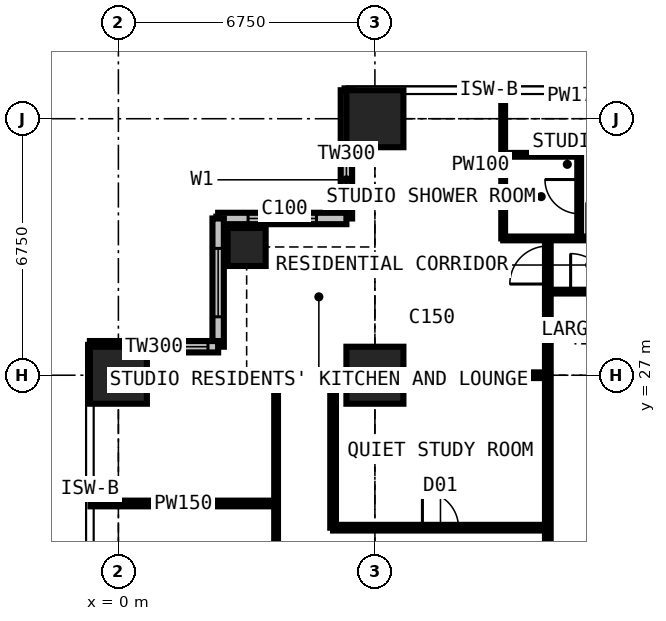
"""IFC4 building model, lengths in metres.
Left out: names, types, materials, properties, quantities, classifications, styles, units other than length and angle.
Written with IfcOpenShell. Run it as: python <this file> out.ifc"""

import sys

from ifc_helpers import new_model, si_unit, direction, frame, frame_2d, origin, origin_2d, place, context, subcontext, project, spatial, rectangle, extrude, element, fill, save


model = new_model("IFC4")
c1 = context("Model", 3, precision=1e-05, world=origin(), true_north=direction((0.0, 1.0)))
c2 = subcontext(c1, "Body", "Model", "MODEL_VIEW")
j1 = project(units=[si_unit("LENGTHUNIT", "METRE"), si_unit("PLANEANGLEUNIT", "RADIAN")], contexts=[c1])
p1 = place(None, origin())
s1 = spatial("IfcSite", under=j1, at=p1, CompositionType="ELEMENT")
p2 = place(p1, origin())
s2 = spatial("IfcBuilding", under=s1, at=p2, CompositionType="ELEMENT")
p3 = place(p2, frame((0.0, 0.0, 123.3)))
s3 = spatial("IfcBuildingStorey", under=s2, at=p3, CompositionType="ELEMENT", Elevation=123.3)
p4 = place(p3, frame((0.0, 27.0, 0.0), z_axis=(0.0, 0.0, 1.0), x_axis=(1.0, 0.0, 0.0)))
e1 = element("IfcColumn", 1, at=p4, inside=s3, PredefinedType="COLUMN", context=c2, shape_type="SweptSolid", body=[
    extrude(rectangle(XDim=1.5, YDim=1.5, at=origin_2d()), origin(), (0.0, 0.0, 1.0), 3.6),
])
p5 = place(p3, frame((3.375, 30.375, 0.0), z_axis=(0.0, 0.0, 1.0), x_axis=(1.0, 0.0, 0.0)))
e2 = element("IfcColumn", 2, at=p5, inside=s3, PredefinedType="COLUMN", context=c2, shape_type="SweptSolid", body=[
    extrude(rectangle(XDim=1.0, YDim=1.0, at=origin_2d()), origin(), (0.0, 0.0, 1.0), 3.6),
])
for number, where, z_axis, x_axis in (
    (3, (6.75, 27.0, 0.0), (0.0, 0.0, 1.0), (1.0, 0.0, 0.0)),
    (4, (6.75, 33.75, 0.0), (0.0, 0.0, 1.0), (1.0, 0.0, 0.0)),
):
    element("IfcColumn", number, at=place(p3, frame(where, z_axis=z_axis, x_axis=x_axis)), inside=s3, PredefinedType="COLUMN", context=c2, shape_type="SweptSolid", body=[
        extrude(rectangle(XDim=1.5, YDim=1.5, at=origin_2d()), origin(), (0.0, 0.0, 1.0), 3.6),
    ])
p6 = place(p3, frame((6.0, 34.5, 0.0), z_axis=(0.0, 0.0, 1.0), x_axis=(0.0, -1.0, 0.0)))
e5 = element("IfcWall", 5, at=p6, inside=s3, PredefinedType="SOLIDWALL", context=c2, shape_type="SweptSolid", body=[
    extrude(rectangle(XDim=3.375, YDim=0.3, at=frame_2d((1.688, 0.0))), origin(), (0.0, 0.0, 1.0), 3.375),
])
p7 = place(p6, frame((1.607, 0.0, 0.9)))
e6 = element("IfcOpeningElement", 6, at=p7, cuts=e5, PredefinedType="OPENING", context=c2, shape_type="SweptSolid", body=[
    extrude(rectangle(XDim=1.5, YDim=1.8, at=frame_2d((0.75, 0.9))), frame((0.0, 0.16, 0.0), z_axis=(0.0, -1.0, 0.0), x_axis=(1.0, 0.0, 0.0)), (0.0, 0.0, 1.0), 0.32),
])
p8 = place(p3, frame((6.0, 31.125, 0.0), z_axis=(0.0, 0.0, 1.0), x_axis=(-1.0, 0.0, 0.0)))
e7 = element("IfcWall", 7, at=p8, inside=s3, PredefinedType="SOLIDWALL", context=c2, shape_type="SweptSolid", body=[
    extrude(rectangle(XDim=3.375, YDim=0.3, at=frame_2d((1.688, 0.0))), origin(), (0.0, 0.0, 1.0), 3.375),
])
p9 = place(p8, frame((0.788, 0.0, 0.6)))
e8 = element("IfcOpeningElement", 8, at=p9, cuts=e7, PredefinedType="OPENING", context=c2, shape_type="SweptSolid", body=[
    extrude(rectangle(XDim=1.8, YDim=2.1, at=frame_2d((0.9, 1.05))), frame((0.0, 0.16, 0.0), z_axis=(0.0, -1.0, 0.0), x_axis=(1.0, 0.0, 0.0)), (0.0, 0.0, 1.0), 0.32),
])
p10 = place(p3, frame((2.625, 31.125, 0.0), z_axis=(0.0, 0.0, 1.0), x_axis=(0.0, -1.0, 0.0)))
e9 = element("IfcWall", 9, at=p10, inside=s3, PredefinedType="SOLIDWALL", context=c2, shape_type="SweptSolid", body=[
    extrude(rectangle(XDim=3.375, YDim=0.3, at=frame_2d((1.688, 0.0))), origin(), (0.0, 0.0, 1.0), 3.375),
])
p11 = place(p10, frame((0.788, 0.0, 0.6)))
e10 = element("IfcOpeningElement", 10, at=p11, cuts=e9, PredefinedType="OPENING", context=c2, shape_type="SweptSolid", body=[
    extrude(rectangle(XDim=1.8, YDim=2.1, at=frame_2d((0.9, 1.05))), frame((0.0, 0.16, 0.0), z_axis=(0.0, -1.0, 0.0), x_axis=(1.0, 0.0, 0.0)), (0.0, 0.0, 1.0), 0.32),
])
p12 = place(p3, frame((2.625, 27.75, 0.0), z_axis=(0.0, 0.0, 1.0), x_axis=(-1.0, 0.0, 0.0)))
e11 = element("IfcWall", 11, at=p12, inside=s3, PredefinedType="SOLIDWALL", context=c2, shape_type="SweptSolid", body=[
    extrude(rectangle(XDim=3.375, YDim=0.3, at=frame_2d((1.688, 0.0))), origin(), (0.0, 0.0, 1.0), 3.375),
])
p13 = place(p12, frame((0.268, 0.0, 0.9)))
e12 = element("IfcOpeningElement", 12, at=p13, cuts=e11, PredefinedType="OPENING", context=c2, shape_type="SweptSolid", body=[
    extrude(rectangle(XDim=1.5, YDim=1.8, at=frame_2d((0.75, 0.9))), frame((0.0, 0.16, 0.0), z_axis=(0.0, -1.0, 0.0), x_axis=(1.0, 0.0, 0.0)), (0.0, 0.0, 1.0), 0.32),
])
p14 = place(p3, frame((-0.734, 23.625, 0.0), z_axis=(0.0, 0.0, 1.0), x_axis=(1.0, 0.0, 0.0)))
e13 = element("IfcWall", 13, at=p14, inside=s3, PredefinedType="PARTITIONING", context=c2, shape_type="SweptSolid", body=[
    extrude(rectangle(XDim=4.884, YDim=0.15, at=frame_2d((2.442, 0.0))), origin(), (0.0, 0.0, 1.0), 3.375),
])
p15 = place(p3, frame((4.15, 10.125, 0.0), z_axis=(0.0, 0.0, 1.0), x_axis=(0.0, 1.0, 0.0)))
e14 = element("IfcWall", 14, at=p15, inside=s3, PredefinedType="PARTITIONING", context=c2, shape_type="SweptSolid", body=[
    extrude(rectangle(XDim=16.875, YDim=0.1, at=frame_2d((8.438, 0.0))), origin(), (0.0, 0.0, 1.0), 3.375),
])
p16 = place(p15, frame((4.2, 0.0, 0.0)))
e15 = element("IfcOpeningElement", 15, at=p16, cuts=e14, PredefinedType="OPENING", context=c2, shape_type="SweptSolid", body=[
    extrude(rectangle(XDim=0.95, YDim=2.2, at=frame_2d((0.475, 1.1))), frame((0.0, 0.06, 0.0), z_axis=(0.0, -1.0, 0.0), x_axis=(1.0, 0.0, 0.0)), (0.0, 0.0, 1.0), 0.12),
])
p17 = place(p15, frame((10.95, 0.0, 0.0)))
e16 = element("IfcOpeningElement", 16, at=p17, cuts=e14, PredefinedType="OPENING", context=c2, shape_type="SweptSolid", body=[
    extrude(rectangle(XDim=0.95, YDim=2.2, at=frame_2d((0.475, 1.1))), frame((0.0, 0.06, 0.0), z_axis=(0.0, -1.0, 0.0), x_axis=(1.0, 0.0, 0.0)), (0.0, 0.0, 1.0), 0.12),
])
p18 = place(p3, frame((4.15, 27.0, 0.0), z_axis=(0.0, 0.0, 1.0), x_axis=(1.0, 0.0, 0.0)))
e17 = element("IfcWall", 17, at=p18, inside=s3, PredefinedType="PARTITIONING", context=c2, shape_type="SweptSolid", body=[
    extrude(rectangle(XDim=7.15, YDim=0.15, at=frame_2d((3.575, 0.0))), origin(), (0.0, 0.0, 1.0), 2.806),
])
p19 = place(p3, frame((5.65, 22.988, 0.0), z_axis=(0.0, 0.0, 1.0), x_axis=(0.0, 1.0, 0.0)))
e18 = element("IfcWall", 18, at=p19, inside=s3, PredefinedType="PARTITIONING", context=c2, shape_type="SweptSolid", body=[
    extrude(rectangle(XDim=4.012, YDim=0.15, at=frame_2d((2.006, 0.0))), origin(), (0.0, 0.0, 1.0), 3.375),
])
p20 = place(p3, frame((5.65, 22.988, 0.0), z_axis=(0.0, 0.0, 1.0), x_axis=(1.0, 0.0, 0.0)))
e19 = element("IfcWall", 19, at=p20, inside=s3, PredefinedType="PARTITIONING", context=c2, shape_type="SweptSolid", body=[
    extrude(rectangle(XDim=5.65, YDim=0.15, at=frame_2d((2.825, 0.0))), origin(), (0.0, 0.0, 1.0), 3.375),
])
p21 = place(p20, frame((2.35, 0.0, 0.0)))
e20 = element("IfcOpeningElement", 20, at=p21, cuts=e19, PredefinedType="OPENING", context=c2, shape_type="SweptSolid", body=[
    extrude(rectangle(XDim=0.95, YDim=2.2, at=frame_2d((0.475, 1.1))), frame((0.0, 0.085, 0.0), z_axis=(0.0, -1.0, 0.0), x_axis=(1.0, 0.0, 0.0)), (0.0, 0.0, 1.0), 0.17),
])
p22 = place(p3, frame((10.125, 30.6, 0.0), z_axis=(0.0, 0.0, 1.0), x_axis=(0.0, 1.0, 0.0)))
e21 = element("IfcWall", 21, at=p22, inside=s3, PredefinedType="PARTITIONING", context=c2, shape_type="SweptSolid", body=[
    extrude(rectangle(XDim=3.884, YDim=0.1, at=frame_2d((1.942, 0.0))), origin(), (0.0, 0.0, 1.0), 3.375),
])
p23 = place(p3, frame((10.125, 30.6, 0.0), z_axis=(0.0, 0.0, 1.0), x_axis=(1.0, 0.0, 0.0)))
e22 = element("IfcWall", 22, at=p23, inside=s3, PredefinedType="PARTITIONING", context=c2, shape_type="SweptSolid", body=[
    extrude(rectangle(XDim=3.375, YDim=0.1, at=frame_2d((1.688, 0.0))), origin(), (0.0, 0.0, 1.0), 3.375),
])
p24 = place(p23, frame((2.2, 0.0, 0.0)))
e23 = element("IfcOpeningElement", 23, at=p24, cuts=e22, PredefinedType="OPENING", context=c2, shape_type="SweptSolid", body=[
    extrude(rectangle(XDim=0.95, YDim=2.2, at=frame_2d((0.475, 1.1))), frame((0.0, 0.06, 0.0), z_axis=(0.0, -1.0, 0.0), x_axis=(1.0, 0.0, 0.0)), (0.0, 0.0, 1.0), 0.12),
])
p25 = place(p3, frame((10.125, 32.8, 0.0), z_axis=(0.0, 0.0, 1.0), x_axis=(1.0, 0.0, 0.0)))
e24 = element("IfcWall", 24, at=p25, inside=s3, PredefinedType="PARTITIONING", context=c2, shape_type="SweptSolid", body=[
    extrude(rectangle(XDim=2.0, YDim=0.1, at=frame_2d((1.0, 0.0))), origin(), (0.0, 0.0, 1.0), 3.375),
])
p26 = place(p3, frame((11.3, 11.3, 0.0), z_axis=(0.0, 0.0, 1.0), x_axis=(0.0, 1.0, 0.0)))
e25 = element("IfcWall", 25, at=p26, inside=s3, PredefinedType="PARTITIONING", context=c2, shape_type="SweptSolid", body=[
    extrude(rectangle(XDim=19.3, YDim=0.15, at=frame_2d((9.65, 0.0))), origin(), (0.0, 0.0, 1.0), 3.375),
])
p27 = place(p26, frame((18.1, 0.0, 0.0)))
e26 = element("IfcOpeningElement", 26, at=p27, cuts=e25, PredefinedType="OPENING", context=c2, shape_type="SweptSolid", body=[
    extrude(rectangle(XDim=1.0, YDim=2.2, at=frame_2d((0.5, 1.1))), frame((0.0, 0.085, 0.0), z_axis=(0.0, -1.0, 0.0), x_axis=(1.0, 0.0, 0.0)), (0.0, 0.0, 1.0), 0.17),
])
p28 = place(p26, frame((10.137, 0.0, 0.0)))
e27 = element("IfcOpeningElement", 27, at=p28, cuts=e25, PredefinedType="OPENING", context=c2, shape_type="SweptSolid", body=[
    extrude(rectangle(XDim=1.0, YDim=2.2, at=frame_2d((0.5, 1.1))), frame((0.0, 0.085, 0.0), z_axis=(0.0, -1.0, 0.0), x_axis=(1.0, 0.0, 0.0)), (0.0, 0.0, 1.0), 0.17),
])
p29 = place(p3, frame((11.3, 29.2, 0.0), z_axis=(0.0, 0.0, 1.0), x_axis=(1.0, 0.0, 0.0)))
e28 = element("IfcWall", 28, at=p29, inside=s3, PredefinedType="PARTITIONING", context=c2, shape_type="SweptSolid", body=[
    extrude(rectangle(XDim=19.075, YDim=0.1, at=frame_2d((9.538, 0.0))), origin(), (0.0, 0.0, 1.0), 3.375),
])
p30 = place(p29, frame((6.4, 0.0, 0.0)))
e29 = element("IfcOpeningElement", 29, at=p30, cuts=e28, PredefinedType="OPENING", context=c2, shape_type="SweptSolid", body=[
    extrude(rectangle(XDim=0.95, YDim=2.2, at=frame_2d((0.475, 1.1))), frame((0.0, 0.06, 0.0), z_axis=(0.0, -1.0, 0.0), x_axis=(1.0, 0.0, 0.0)), (0.0, 0.0, 1.0), 0.12),
])
p31 = place(p29, frame((13.15, 0.0, 0.0)))
e30 = element("IfcOpeningElement", 30, at=p31, cuts=e28, PredefinedType="OPENING", context=c2, shape_type="SweptSolid", body=[
    extrude(rectangle(XDim=0.95, YDim=2.2, at=frame_2d((0.475, 1.1))), frame((0.0, 0.06, 0.0), z_axis=(0.0, -1.0, 0.0), x_axis=(1.0, 0.0, 0.0)), (0.0, 0.0, 1.0), 0.12),
])
p32 = place(p29, frame((0.6, 0.0, 0.0)))
e31 = element("IfcOpeningElement", 31, at=p32, cuts=e28, PredefinedType="OPENING", context=c2, shape_type="SweptSolid", body=[
    extrude(rectangle(XDim=1.0, YDim=2.2, at=frame_2d((0.5, 1.1))), frame((0.0, 0.06, 0.0), z_axis=(0.0, -1.0, 0.0), x_axis=(1.0, 0.0, 0.0)), (0.0, 0.0, 1.0), 0.12),
])
p33 = place(p3, frame((12.125, 30.6, 0.0), z_axis=(0.0, 0.0, 1.0), x_axis=(0.0, 1.0, 0.0)))
e32 = element("IfcWall", 32, at=p33, inside=s3, PredefinedType="PARTITIONING", context=c2, shape_type="SweptSolid", body=[
    extrude(rectangle(XDim=2.2, YDim=0.1, at=frame_2d((1.1, 0.0))), origin(), (0.0, 0.0, 1.0), 3.375),
])
p34 = place(p33, frame((0.65, 0.0, 0.0)))
e33 = element("IfcOpeningElement", 33, at=p34, cuts=e32, PredefinedType="OPENING", context=c2, shape_type="SweptSolid", body=[
    extrude(rectangle(XDim=0.9, YDim=2.2, at=frame_2d((0.45, 1.1))), frame((0.0, 0.06, 0.0), z_axis=(0.0, -1.0, 0.0), x_axis=(1.0, 0.0, 0.0)), (0.0, 0.0, 1.0), 0.12),
])
p35 = place(p7, origin())
e34 = element("IfcWindow", 34, at=p35, inside=s3, PartitioningType="SINGLE_PANEL", PredefinedType="WINDOW", context=c2, shape_type="SweptSolid", body=[
    extrude(rectangle(XDim=1.5, YDim=1.8, at=frame_2d((0.75, 0.9))), frame((0.0, 0.03, 0.0), z_axis=(0.0, -1.0, 0.0), x_axis=(1.0, 0.0, 0.0)), (0.0, 0.0, 1.0), 0.06),
])
fill(e6, e34)
p36 = place(p9, origin())
e35 = element("IfcWindow", 35, at=p36, inside=s3, PartitioningType="SINGLE_PANEL", PredefinedType="WINDOW", context=c2, shape_type="SweptSolid", body=[
    extrude(rectangle(XDim=1.8, YDim=2.1, at=frame_2d((0.9, 1.05))), frame((0.0, 0.03, 0.0), z_axis=(0.0, -1.0, 0.0), x_axis=(1.0, 0.0, 0.0)), (0.0, 0.0, 1.0), 0.06),
])
fill(e8, e35)
p37 = place(p11, origin())
e36 = element("IfcWindow", 36, at=p37, inside=s3, PartitioningType="SINGLE_PANEL", PredefinedType="WINDOW", context=c2, shape_type="SweptSolid", body=[
    extrude(rectangle(XDim=1.8, YDim=2.1, at=frame_2d((0.9, 1.05))), frame((0.0, 0.03, 0.0), z_axis=(0.0, -1.0, 0.0), x_axis=(1.0, 0.0, 0.0)), (0.0, 0.0, 1.0), 0.06),
])
fill(e10, e36)
p38 = place(p13, origin())
e37 = element("IfcWindow", 37, at=p38, inside=s3, PartitioningType="SINGLE_PANEL", PredefinedType="WINDOW", context=c2, shape_type="SweptSolid", body=[
    extrude(rectangle(XDim=1.5, YDim=1.8, at=frame_2d((0.75, 0.9))), frame((0.0, 0.03, 0.0), z_axis=(0.0, -1.0, 0.0), x_axis=(1.0, 0.0, 0.0)), (0.0, 0.0, 1.0), 0.06),
])
fill(e12, e37)
p39 = place(p34, origin())
e38 = element("IfcDoor", 38, at=p39, inside=s3, OperationType="SINGLE_SWING_RIGHT", PredefinedType="DOOR", context=c2, shape_type="SweptSolid", body=[
    extrude(rectangle(XDim=0.9, YDim=2.2, at=frame_2d((0.45, 1.1))), frame((0.0, 0.025, 0.0), z_axis=(0.0, -1.0, 0.0), x_axis=(1.0, 0.0, 0.0)), (0.0, 0.0, 1.0), 0.05),
])
fill(e33, e38)
p40 = place(p32, origin())
e39 = element("IfcDoor", 39, at=p40, inside=s3, OperationType="SINGLE_SWING_LEFT", PredefinedType="DOOR", context=c2, shape_type="SweptSolid", body=[
    extrude(rectangle(XDim=1.0, YDim=2.2, at=frame_2d((0.5, 1.1))), frame((0.0, 0.025, 0.0), z_axis=(0.0, -1.0, 0.0), x_axis=(1.0, 0.0, 0.0)), (0.0, 0.0, 1.0), 0.05),
])
fill(e31, e39)
p41 = place(p27, origin())
e40 = element("IfcDoor", 40, at=p41, inside=s3, OperationType="SINGLE_SWING_LEFT", PredefinedType="DOOR", context=c2, shape_type="SweptSolid", body=[
    extrude(rectangle(XDim=1.0, YDim=2.2, at=frame_2d((0.5, 1.1))), frame((0.0, 0.025, 0.0), z_axis=(0.0, -1.0, 0.0), x_axis=(1.0, 0.0, 0.0)), (0.0, 0.0, 1.0), 0.05),
])
fill(e26, e40)
p42 = place(p21, origin())
e41 = element("IfcDoor", 41, at=p42, inside=s3, OperationType="SINGLE_SWING_LEFT", PredefinedType="DOOR", context=c2, shape_type="SweptSolid", body=[
    extrude(rectangle(XDim=0.95, YDim=2.2, at=frame_2d((0.475, 1.1))), frame((0.0, 0.025, 0.0), z_axis=(0.0, -1.0, 0.0), x_axis=(1.0, 0.0, 0.0)), (0.0, 0.0, 1.0), 0.05),
])
fill(e20, e41)
save(model, sys.argv[1])
